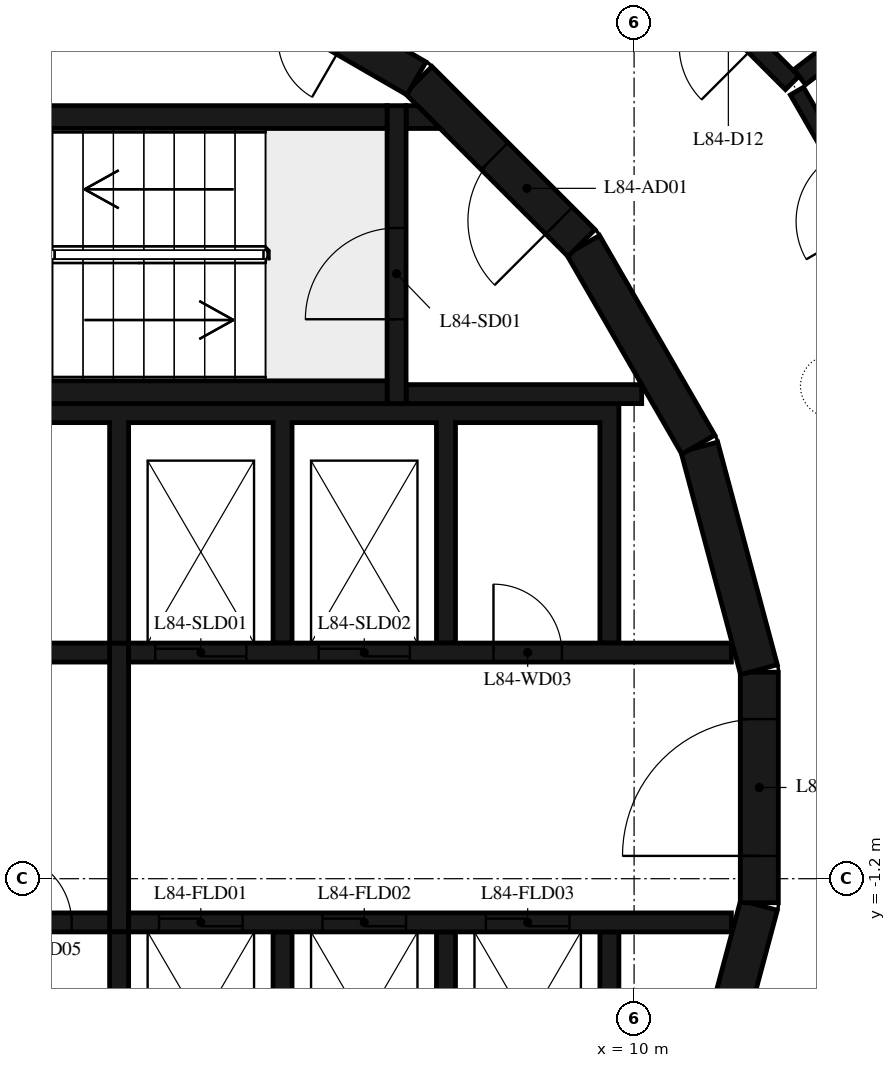
"""IFC4 building model, lengths in metres.
Left out: names, types, materials, properties, quantities, classifications, styles, units other than length and angle.
Written with IfcOpenShell. Run it as: python <this file> out.ifc"""

import sys

from ifc_helpers import new_model, si_unit, direction, frame, frame_2d, origin, place, context, subcontext, project, spatial, polyline, rectangle, outline, extrude, element, fill, save


model = new_model("IFC4")
c1 = context("Model", 3, precision=1e-05, world=origin(), true_north=direction((0.0, 1.0)))
c2 = subcontext(c1, "Body", "Model", "MODEL_VIEW")
j1 = project(units=[si_unit("LENGTHUNIT", "METRE"), si_unit("PLANEANGLEUNIT", "RADIAN")], contexts=[c1])
p1 = place(None, origin())
s1 = spatial("IfcSite", under=j1, at=p1, CompositionType="ELEMENT")
p2 = place(p1, origin())
s2 = spatial("IfcBuilding", under=s1, at=p2, CompositionType="ELEMENT")
p3 = place(p2, frame((0.0, 0.0, 326.2)))
s3 = spatial("IfcBuildingStorey", under=s2, at=p3, CompositionType="ELEMENT", Elevation=326.2)
p4 = place(p3, frame((10.858, -4.479, 0.0), z_axis=(0.0, 0.0, 1.0), x_axis=(0.258734743916, 0.965948410781, 0.0)))
e1 = element("IfcWall", 1, at=p4, inside=s3, PredefinedType="SHEAR", context=c2, shape_type="SweptSolid", body=[
    extrude(rectangle(XDim=3.033, YDim=0.5, at=frame_2d((1.516, 0.0))), origin(), (0.0, 0.0, 1.0), 6.35),
])
p5 = place(p3, frame((11.647, -1.516, 0.0), z_axis=(0.0, 0.0, 1.0), x_axis=(0.0, 1.0, 0.0)))
e2 = element("IfcWall", 2, at=p5, inside=s3, PredefinedType="SHEAR", context=c2, shape_type="SweptSolid", body=[
    extrude(rectangle(XDim=3.033, YDim=0.5, at=frame_2d((1.516, 0.0))), origin(), (0.0, 0.0, 1.0), 6.35),
])
p6 = place(p5, frame((0.616, 0.0, 0.0)))
e3 = element("IfcOpeningElement", 3, at=p6, cuts=e2, PredefinedType="OPENING", context=c2, shape_type="SweptSolid", body=[
    extrude(rectangle(XDim=1.8, YDim=2.1, at=frame_2d((0.9, 1.05))), frame((0.0, 0.26, 0.0), z_axis=(0.0, -1.0, 0.0), x_axis=(1.0, 0.0, 0.0)), (0.0, 0.0, 1.0), 0.52),
])
for number, where, z_axis, x_axis in (
    (4, (11.643, 1.55, 0.0), (0.0, 0.0, 1.0), (-0.259, 0.966, 0.0)),
    (5, (10.845, 4.51, 0.0), (0.0, 0.0, 1.0), (-0.5, 0.866, 0.0)),
):
    element("IfcWall", number, at=place(p3, frame(where, z_axis=z_axis, x_axis=x_axis)), inside=s3, PredefinedType="SHEAR", context=c2, shape_type="SweptSolid", body=[
        extrude(rectangle(XDim=3.033, YDim=0.5, at=frame_2d((1.516, 0.0))), origin(), (0.0, 0.0, 1.0), 6.35),
    ])
p7 = place(p3, frame((9.308, 7.164, 0.0), z_axis=(0.0, 0.0, 1.0), x_axis=(-0.707106781187, 0.707106781187, 0.0)))
e6 = element("IfcWall", 6, at=p7, inside=s3, PredefinedType="SHEAR", context=c2, shape_type="SweptSolid", body=[
    extrude(rectangle(XDim=3.032, YDim=0.5, at=frame_2d((1.516, 0.0))), origin(), (0.0, 0.0, 1.0), 6.35),
])
p8 = place(p7, frame((0.416, 0.0, 0.0)))
e7 = element("IfcOpeningElement", 7, at=p8, cuts=e6, PredefinedType="OPENING", context=c2, shape_type="SweptSolid", body=[
    extrude(rectangle(XDim=1.2, YDim=2.1, at=frame_2d((0.6, 1.05))), frame((0.0, 0.26, 0.0), z_axis=(0.0, -1.0, 0.0), x_axis=(1.0, 0.0, 0.0)), (0.0, 0.0, 1.0), 0.52),
])
p9 = place(p3, frame((7.137, 9.329, 0.0), z_axis=(0.0, 0.0, 1.0), x_axis=(-0.865975092491, 0.500087131594, 0.0)))
e8 = element("IfcWall", 8, at=p9, inside=s3, PredefinedType="SHEAR", context=c2, shape_type="SweptSolid", body=[
    extrude(rectangle(XDim=3.033, YDim=0.5, at=frame_2d((1.516, 0.0))), origin(), (0.0, 0.0, 1.0), 6.35),
])
p10 = place(p9, frame((1.066, 0.0, 0.0)))
e9 = element("IfcOpeningElement", 9, at=p10, cuts=e8, PredefinedType="OPENING", context=c2, shape_type="SweptSolid", body=[
    extrude(rectangle(XDim=0.9, YDim=2.1, at=frame_2d((0.45, 1.05))), frame((0.0, 0.26, 0.0), z_axis=(0.0, -1.0, 0.0), x_axis=(1.0, 0.0, 0.0)), (0.0, 0.0, 1.0), 0.52),
])
for number, where, z_axis, x_axis in (
    (10, (0.0, 5.2, 0.0), (0.0, 0.0, 1.0), (1.0, 0.0, 0.0)),
    (11, (0.0, 8.82, 0.0), (0.0, 0.0, 1.0), (1.0, 0.0, 0.0)),
):
    element("IfcWall", number, at=place(p3, frame(where, z_axis=z_axis, x_axis=x_axis)), inside=s3, PredefinedType="SHEAR", context=c2, shape_type="SweptSolid", body=[
        extrude(rectangle(XDim=6.75, YDim=0.3, at=frame_2d((3.375, 0.0))), origin(), (0.0, 0.0, 1.0), 6.35),
    ])
p11 = place(p3, frame((6.875, 5.05, 0.0), z_axis=(0.0, 0.0, 1.0), x_axis=(0.0, 1.0, 0.0)))
e12 = element("IfcWall", 12, at=p11, inside=s3, PredefinedType="SHEAR", context=c2, shape_type="SweptSolid", body=[
    extrude(rectangle(XDim=3.92, YDim=0.25, at=frame_2d((1.96, 0.0))), origin(), (0.0, 0.0, 1.0), 6.35),
])
p12 = place(p11, frame((1.11, 0.0, 0.0)))
e13 = element("IfcOpeningElement", 13, at=p12, cuts=e12, PredefinedType="OPENING", context=c2, shape_type="SweptSolid", body=[
    extrude(rectangle(XDim=1.2, YDim=2.1, at=frame_2d((0.6, 1.05))), frame((0.0, 0.135, 0.0), z_axis=(0.0, -1.0, 0.0), x_axis=(1.0, 0.0, 0.0)), (0.0, 0.0, 1.0), 0.27),
])
p13 = place(p3, frame((7.0, 5.175, 0.0), z_axis=(0.0, 0.0, 1.0), x_axis=(1.0, 0.0, 0.0)))
e14 = element("IfcWall", 14, at=p13, inside=s3, PredefinedType="SHEAR", context=c2, shape_type="SweptSolid", body=[
    extrude(rectangle(XDim=3.1, YDim=0.25, at=frame_2d((1.55, 0.0))), origin(), (0.0, 0.0, 1.0), 6.35),
])
p14 = place(p3, origin())
e15 = element("IfcWall", 15, at=p14, inside=s3, PredefinedType="SHEAR", context=c2, shape_type="SweptSolid", body=[
    extrude(outline(polyline([(7.448, 8.67), (7.0, 8.67), (7.0, 8.97), (7.148, 8.97), (7.448, 8.67)])), origin(), (0.0, 0.0, 1.0), 6.35),
])
p15 = place(p3, origin())
e16 = element("IfcWall", 16, at=p15, inside=s3, PredefinedType="SHEAR", context=c2, shape_type="SweptSolid", body=[
    extrude(outline(polyline([(-9.8, 1.9), (-9.55, 1.9), (-9.55, 4.8), (-5.5, 4.8), (-5.5, 1.9), (-5.25, 1.9), (-5.25, 4.8), (3.1, 4.8), (3.1, 1.9), (3.35, 1.9), (3.35, 4.8), (5.25, 4.8), (5.25, 1.9), (5.5, 1.9), (5.5, 4.8), (7.4, 4.8), (7.4, 1.9), (7.65, 1.9), (7.65, 4.8), (9.55, 4.8), (9.55, 1.9), (9.8, 1.9), (9.8, 4.8), (9.8, 5.05), (-9.8, 5.05), (-9.8, 4.8), (-9.8, 1.9)])), origin(), (0.0, 0.0, 1.0), 6.35),
])
p16 = place(p3, origin())
e17 = element("IfcWall", 17, at=p16, inside=s3, PredefinedType="SHEAR", context=c2, shape_type="SweptSolid", body=[
    extrude(outline(polyline([(9.8, -5.05), (9.8, -4.8), (9.8, -1.9), (9.55, -1.9), (9.55, -4.8), (7.65, -4.8), (7.65, -1.9), (7.4, -1.9), (7.4, -4.8), (5.5, -4.8), (5.5, -1.9), (5.25, -1.9), (5.25, -4.8), (3.35, -4.8), (3.35, -1.9), (3.1, -1.9), (3.1, -4.8), (1.2, -4.8), (1.2, -1.9), (0.95, -1.9), (0.95, -4.8), (-0.95, -4.8), (-0.95, -1.9), (-1.2, -1.9), (-1.2, -4.8), (-3.1, -4.8), (-3.1, -1.9), (-3.35, -1.9), (-3.35, -4.8), (-5.25, -4.8), (-5.25, -1.9), (-5.5, -1.9), (-5.5, -4.8), (-9.55, -4.8), (-9.55, -1.9), (-9.8, -1.9), (-9.8, -4.8), (-9.8, -5.05), (9.8, -5.05)])), origin(), (0.0, 0.0, 1.0), 6.35),
])
p17 = place(p3, frame((-11.28, 1.775, 0.0), z_axis=(0.0, 0.0, 1.0), x_axis=(1.0, 0.0, 0.0)))
e18 = element("IfcWall", 18, at=p17, inside=s3, PredefinedType="SHEAR", context=c2, shape_type="SweptSolid", body=[
    extrude(rectangle(XDim=14.38, YDim=0.25, at=frame_2d((7.19, 0.0))), origin(), (0.0, 0.0, 1.0), 6.35),
])
p18 = place(p17, frame((3.305, 0.0, 0.0)))
e19 = element("IfcOpeningElement", 19, at=p18, cuts=e18, PredefinedType="OPENING", context=c2, shape_type="SweptSolid", body=[
    extrude(rectangle(XDim=0.9, YDim=2.1, at=frame_2d((0.45, 1.05))), frame((0.0, 0.135, 0.0), z_axis=(0.0, -1.0, 0.0), x_axis=(1.0, 0.0, 0.0)), (0.0, 0.0, 1.0), 0.27),
])
p19 = place(p17, frame((9.755, 0.0, 0.0)))
e20 = element("IfcOpeningElement", 20, at=p19, cuts=e18, PredefinedType="OPENING", context=c2, shape_type="SweptSolid", body=[
    extrude(rectangle(XDim=0.9, YDim=2.1, at=frame_2d((0.45, 1.05))), frame((0.0, 0.135, 0.0), z_axis=(0.0, -1.0, 0.0), x_axis=(1.0, 0.0, 0.0)), (0.0, 0.0, 1.0), 0.27),
])
p20 = place(p3, frame((3.35, 1.775, 0.0), z_axis=(0.0, 0.0, 1.0), x_axis=(1.0, 0.0, 0.0)))
e21 = element("IfcWall", 21, at=p20, inside=s3, PredefinedType="SHEAR", context=c2, shape_type="SweptSolid", body=[
    extrude(rectangle(XDim=7.93, YDim=0.25, at=frame_2d((3.965, 0.0))), origin(), (0.0, 0.0, 1.0), 6.35),
])
p21 = place(p20, frame((0.35, 0.0, 0.0)))
e22 = element("IfcOpeningElement", 22, at=p21, cuts=e21, PredefinedType="OPENING", context=c2, shape_type="SweptSolid", body=[
    extrude(rectangle(XDim=1.2, YDim=2.4, at=frame_2d((0.6, 1.2))), frame((0.0, 0.135, 0.0), z_axis=(0.0, -1.0, 0.0), x_axis=(1.0, 0.0, 0.0)), (0.0, 0.0, 1.0), 0.27),
])
p22 = place(p20, frame((2.5, 0.0, 0.0)))
e23 = element("IfcOpeningElement", 23, at=p22, cuts=e21, PredefinedType="OPENING", context=c2, shape_type="SweptSolid", body=[
    extrude(rectangle(XDim=1.2, YDim=2.4, at=frame_2d((0.6, 1.2))), frame((0.0, 0.135, 0.0), z_axis=(0.0, -1.0, 0.0), x_axis=(1.0, 0.0, 0.0)), (0.0, 0.0, 1.0), 0.27),
])
p23 = place(p20, frame((4.8, 0.0, 0.0)))
e24 = element("IfcOpeningElement", 24, at=p23, cuts=e21, PredefinedType="OPENING", context=c2, shape_type="SweptSolid", body=[
    extrude(rectangle(XDim=0.9, YDim=2.1, at=frame_2d((0.45, 1.05))), frame((0.0, 0.135, 0.0), z_axis=(0.0, -1.0, 0.0), x_axis=(1.0, 0.0, 0.0)), (0.0, 0.0, 1.0), 0.27),
])
p24 = place(p3, frame((-11.28, -1.775, 0.0), z_axis=(0.0, 0.0, 1.0), x_axis=(1.0, 0.0, 0.0)))
e25 = element("IfcWall", 25, at=p24, inside=s3, PredefinedType="SHEAR", context=c2, shape_type="SweptSolid", body=[
    extrude(rectangle(XDim=14.38, YDim=0.25, at=frame_2d((7.19, 0.0))), origin(), (0.0, 0.0, 1.0), 6.35),
])
p25 = place(p24, frame((6.43, 0.0, 0.0)))
e26 = element("IfcOpeningElement", 26, at=p25, cuts=e25, PredefinedType="OPENING", context=c2, shape_type="SweptSolid", body=[
    extrude(rectangle(XDim=1.1, YDim=2.1, at=frame_2d((0.55, 1.05))), frame((0.0, 0.135, 0.0), z_axis=(0.0, -1.0, 0.0), x_axis=(1.0, 0.0, 0.0)), (0.0, 0.0, 1.0), 0.27),
])
p26 = place(p24, frame((8.58, 0.0, 0.0)))
e27 = element("IfcOpeningElement", 27, at=p26, cuts=e25, PredefinedType="OPENING", context=c2, shape_type="SweptSolid", body=[
    extrude(rectangle(XDim=1.1, YDim=2.1, at=frame_2d((0.55, 1.05))), frame((0.0, 0.135, 0.0), z_axis=(0.0, -1.0, 0.0), x_axis=(1.0, 0.0, 0.0)), (0.0, 0.0, 1.0), 0.27),
])
p27 = place(p24, frame((10.73, 0.0, 0.0)))
e28 = element("IfcOpeningElement", 28, at=p27, cuts=e25, PredefinedType="OPENING", context=c2, shape_type="SweptSolid", body=[
    extrude(rectangle(XDim=1.1, YDim=2.1, at=frame_2d((0.55, 1.05))), frame((0.0, 0.135, 0.0), z_axis=(0.0, -1.0, 0.0), x_axis=(1.0, 0.0, 0.0)), (0.0, 0.0, 1.0), 0.27),
])
p28 = place(p24, frame((3.305, 0.0, 0.0)))
e29 = element("IfcOpeningElement", 29, at=p28, cuts=e25, PredefinedType="OPENING", context=c2, shape_type="SweptSolid", body=[
    extrude(rectangle(XDim=0.9, YDim=2.1, at=frame_2d((0.45, 1.05))), frame((0.0, 0.135, 0.0), z_axis=(0.0, -1.0, 0.0), x_axis=(1.0, 0.0, 0.0)), (0.0, 0.0, 1.0), 0.27),
])
p29 = place(p24, frame((12.98, 0.0, 0.0)))
e30 = element("IfcOpeningElement", 30, at=p29, cuts=e25, PredefinedType="OPENING", context=c2, shape_type="SweptSolid", body=[
    extrude(rectangle(XDim=0.9, YDim=2.1, at=frame_2d((0.45, 1.05))), frame((0.0, 0.135, 0.0), z_axis=(0.0, -1.0, 0.0), x_axis=(1.0, 0.0, 0.0)), (0.0, 0.0, 1.0), 0.27),
])
p30 = place(p3, frame((3.35, -1.775, 0.0), z_axis=(0.0, 0.0, 1.0), x_axis=(1.0, 0.0, 0.0)))
e31 = element("IfcWall", 31, at=p30, inside=s3, PredefinedType="SHEAR", context=c2, shape_type="SweptSolid", body=[
    extrude(rectangle(XDim=7.93, YDim=0.25, at=frame_2d((3.965, 0.0))), origin(), (0.0, 0.0, 1.0), 6.35),
])
p31 = place(p30, frame((0.4, 0.0, 0.0)))
e32 = element("IfcOpeningElement", 32, at=p31, cuts=e31, PredefinedType="OPENING", context=c2, shape_type="SweptSolid", body=[
    extrude(rectangle(XDim=1.1, YDim=2.4, at=frame_2d((0.55, 1.2))), frame((0.0, 0.135, 0.0), z_axis=(0.0, -1.0, 0.0), x_axis=(1.0, 0.0, 0.0)), (0.0, 0.0, 1.0), 0.27),
])
p32 = place(p30, frame((2.55, 0.0, 0.0)))
e33 = element("IfcOpeningElement", 33, at=p32, cuts=e31, PredefinedType="OPENING", context=c2, shape_type="SweptSolid", body=[
    extrude(rectangle(XDim=1.1, YDim=2.4, at=frame_2d((0.55, 1.2))), frame((0.0, 0.135, 0.0), z_axis=(0.0, -1.0, 0.0), x_axis=(1.0, 0.0, 0.0)), (0.0, 0.0, 1.0), 0.27),
])
p33 = place(p30, frame((4.7, 0.0, 0.0)))
e34 = element("IfcOpeningElement", 34, at=p33, cuts=e31, PredefinedType="OPENING", context=c2, shape_type="SweptSolid", body=[
    extrude(rectangle(XDim=1.1, YDim=2.4, at=frame_2d((0.55, 1.2))), frame((0.0, 0.135, 0.0), z_axis=(0.0, -1.0, 0.0), x_axis=(1.0, 0.0, 0.0)), (0.0, 0.0, 1.0), 0.27),
])
p34 = place(p3, frame((3.225, -1.9, 0.0), z_axis=(0.0, 0.0, 1.0), x_axis=(0.0, 1.0, 0.0)))
e35 = element("IfcWall", 35, at=p34, inside=s3, PredefinedType="SHEAR", context=c2, shape_type="SweptSolid", body=[
    extrude(rectangle(XDim=3.8, YDim=0.25, at=frame_2d((1.9, 0.0))), origin(), (0.0, 0.0, 1.0), 6.35),
])
p35 = place(p3, frame((12.08, 9.27, 0.0), z_axis=(0.0, 0.0, 1.0), x_axis=(-0.707158156693, 0.707055401947, 0.0)))
e36 = element("IfcWall", 36, at=p35, inside=s3, PredefinedType="PARTITIONING", context=c2, shape_type="SweptSolid", body=[
    extrude(rectangle(XDim=2.376, YDim=0.25, at=frame_2d((1.188, 0.0))), origin(), (0.0, 0.0, 1.0), 6.35),
])
p36 = place(p35, frame((0.688, 0.0, 0.0)))
e37 = element("IfcOpeningElement", 37, at=p36, cuts=e36, PredefinedType="OPENING", context=c2, shape_type="SweptSolid", body=[
    extrude(rectangle(XDim=1.0, YDim=2.1, at=frame_2d((0.5, 1.05))), frame((0.0, 0.135, 0.0), z_axis=(0.0, -1.0, 0.0), x_axis=(1.0, 0.0, 0.0)), (0.0, 0.0, 1.0), 0.27),
])
p37 = place(p3, frame((12.179, 9.346, 0.0), z_axis=(0.0, 0.0, 1.0), x_axis=(0.793367328709, 0.608743198513, 0.0)))
e38 = element("IfcWall", 38, at=p37, inside=s3, PredefinedType="PARTITIONING", context=c2, shape_type="SweptSolid", body=[
    extrude(rectangle(XDim=6.429, YDim=0.25, at=frame_2d((3.215, 0.0))), origin(), (0.0, 0.0, 1.0), 6.35),
])
p38 = place(p3, frame((13.62, 6.6, 0.0), z_axis=(0.0, 0.0, 1.0), x_axis=(-0.499717688814, 0.866188334882, 0.0)))
e39 = element("IfcWall", 39, at=p38, inside=s3, PredefinedType="PARTITIONING", context=c2, shape_type="SweptSolid", body=[
    extrude(rectangle(XDim=2.957, YDim=0.2, at=frame_2d((1.479, 0.0))), origin(), (0.0, 0.0, 1.0), 6.35),
])
p39 = place(p38, frame((0.979, 0.0, 0.0)))
e40 = element("IfcOpeningElement", 40, at=p39, cuts=e39, PredefinedType="OPENING", context=c2, shape_type="SweptSolid", body=[
    extrude(rectangle(XDim=1.0, YDim=2.1, at=frame_2d((0.5, 1.05))), frame((0.0, 0.11, 0.0), z_axis=(0.0, -1.0, 0.0), x_axis=(1.0, 0.0, 0.0)), (0.0, 0.0, 1.0), 0.22),
])
p40 = place(p12, origin())
e41 = element("IfcDoor", 41, at=p40, inside=s3, OperationType="SINGLE_SWING_LEFT", PredefinedType="DOOR", context=c2, shape_type="SweptSolid", body=[
    extrude(rectangle(XDim=1.2, YDim=2.1, at=frame_2d((0.6, 1.05))), frame((0.0, 0.025, 0.0), z_axis=(0.0, -1.0, 0.0), x_axis=(1.0, 0.0, 0.0)), (0.0, 0.0, 1.0), 0.05),
])
fill(e13, e41)
p41 = place(p8, origin())
e42 = element("IfcDoor", 42, at=p41, inside=s3, OperationType="SINGLE_SWING_RIGHT", PredefinedType="DOOR", context=c2, shape_type="SweptSolid", body=[
    extrude(rectangle(XDim=1.2, YDim=2.1, at=frame_2d((0.6, 1.05))), frame((0.0, 0.025, 0.0), z_axis=(0.0, -1.0, 0.0), x_axis=(1.0, 0.0, 0.0)), (0.0, 0.0, 1.0), 0.05),
])
fill(e7, e42)
p42 = place(p6, origin())
e43 = element("IfcDoor", 43, at=p42, inside=s3, OperationType="DOUBLE_DOOR_SINGLE_SWING", PredefinedType="DOOR", context=c2, shape_type="SweptSolid", body=[
    extrude(rectangle(XDim=1.8, YDim=2.1, at=frame_2d((0.9, 1.05))), frame((0.0, 0.025, 0.0), z_axis=(0.0, -1.0, 0.0), x_axis=(1.0, 0.0, 0.0)), (0.0, 0.0, 1.0), 0.05),
])
fill(e3, e43)
p43 = place(p21, origin())
e44 = element("IfcDoor", 44, at=p43, inside=s3, OperationType="DOUBLE_DOOR_SLIDING", PredefinedType="DOOR", context=c2, shape_type="SweptSolid", body=[
    extrude(rectangle(XDim=1.2, YDim=2.4, at=frame_2d((0.6, 1.2))), frame((0.0, 0.025, 0.0), z_axis=(0.0, -1.0, 0.0), x_axis=(1.0, 0.0, 0.0)), (0.0, 0.0, 1.0), 0.05),
])
fill(e22, e44)
p44 = place(p22, origin())
e45 = element("IfcDoor", 45, at=p44, inside=s3, OperationType="DOUBLE_DOOR_SLIDING", PredefinedType="DOOR", context=c2, shape_type="SweptSolid", body=[
    extrude(rectangle(XDim=1.2, YDim=2.4, at=frame_2d((0.6, 1.2))), frame((0.0, 0.025, 0.0), z_axis=(0.0, -1.0, 0.0), x_axis=(1.0, 0.0, 0.0)), (0.0, 0.0, 1.0), 0.05),
])
fill(e23, e45)
p45 = place(p31, origin())
e46 = element("IfcDoor", 46, at=p45, inside=s3, OperationType="DOUBLE_DOOR_SLIDING", PredefinedType="DOOR", context=c2, shape_type="SweptSolid", body=[
    extrude(rectangle(XDim=1.1, YDim=2.4, at=frame_2d((0.55, 1.2))), frame((0.0, 0.025, 0.0), z_axis=(0.0, -1.0, 0.0), x_axis=(1.0, 0.0, 0.0)), (0.0, 0.0, 1.0), 0.05),
])
fill(e32, e46)
p46 = place(p32, origin())
e47 = element("IfcDoor", 47, at=p46, inside=s3, OperationType="DOUBLE_DOOR_SLIDING", PredefinedType="DOOR", context=c2, shape_type="SweptSolid", body=[
    extrude(rectangle(XDim=1.1, YDim=2.4, at=frame_2d((0.55, 1.2))), frame((0.0, 0.025, 0.0), z_axis=(0.0, -1.0, 0.0), x_axis=(1.0, 0.0, 0.0)), (0.0, 0.0, 1.0), 0.05),
])
fill(e33, e47)
p47 = place(p33, origin())
e48 = element("IfcDoor", 48, at=p47, inside=s3, OperationType="DOUBLE_DOOR_SLIDING", PredefinedType="DOOR", context=c2, shape_type="SweptSolid", body=[
    extrude(rectangle(XDim=1.1, YDim=2.4, at=frame_2d((0.55, 1.2))), frame((0.0, 0.025, 0.0), z_axis=(0.0, -1.0, 0.0), x_axis=(1.0, 0.0, 0.0)), (0.0, 0.0, 1.0), 0.05),
])
fill(e34, e48)
p48 = place(p23, origin())
e49 = element("IfcDoor", 49, at=p48, inside=s3, OperationType="SINGLE_SWING_LEFT", PredefinedType="DOOR", context=c2, shape_type="SweptSolid", body=[
    extrude(rectangle(XDim=0.9, YDim=2.1, at=frame_2d((0.45, 1.05))), frame((0.0, 0.025, 0.0), z_axis=(0.0, -1.0, 0.0), x_axis=(1.0, 0.0, 0.0)), (0.0, 0.0, 1.0), 0.05),
])
fill(e24, e49)
p49 = place(p29, origin())
e50 = element("IfcDoor", 50, at=p49, inside=s3, OperationType="SINGLE_SWING_LEFT", PredefinedType="DOOR", context=c2, shape_type="SweptSolid", body=[
    extrude(rectangle(XDim=0.9, YDim=2.1, at=frame_2d((0.45, 1.05))), frame((0.0, 0.025, 0.0), z_axis=(0.0, -1.0, 0.0), x_axis=(1.0, 0.0, 0.0)), (0.0, 0.0, 1.0), 0.05),
])
fill(e30, e50)
save(model, sys.argv[1])
